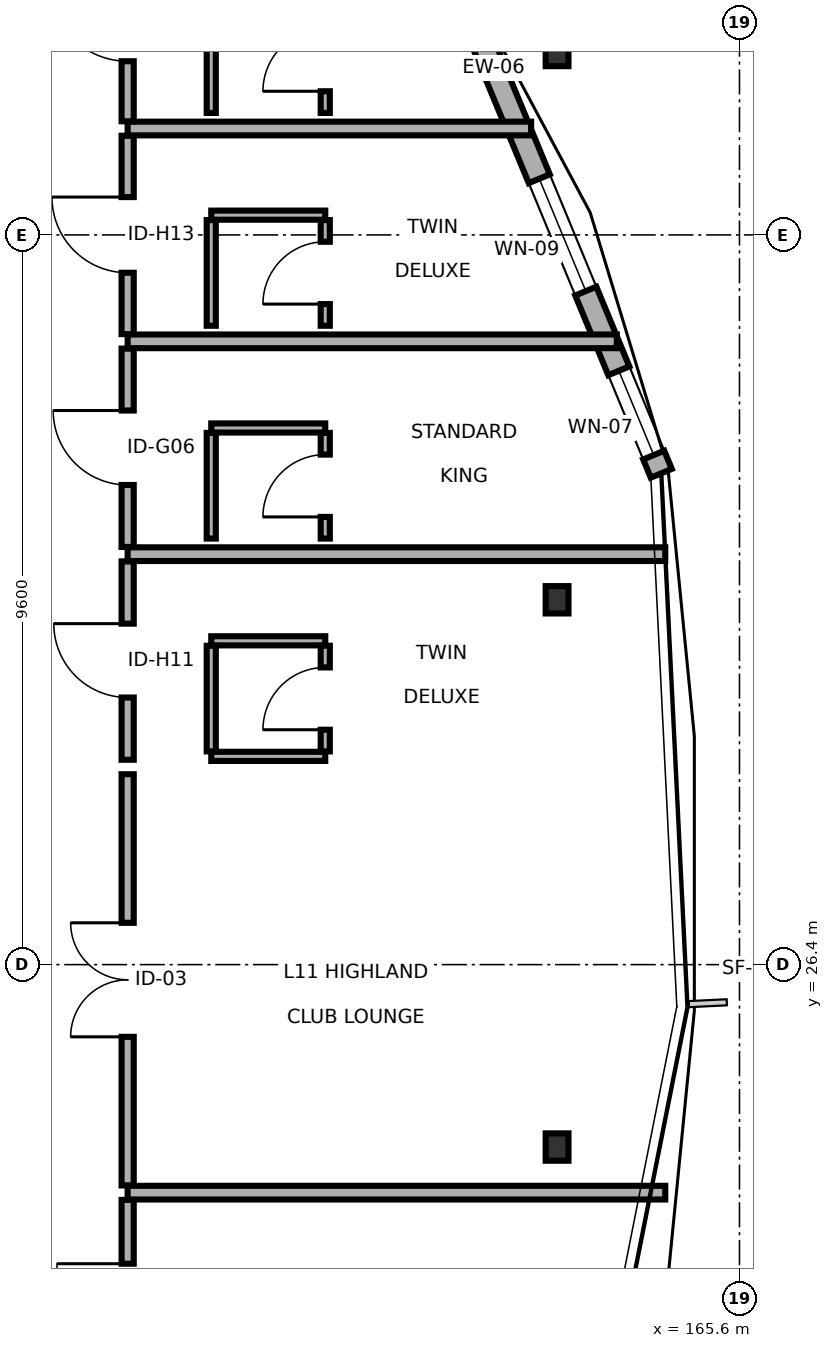
"""IFC4 building model, lengths in metres.
Left out: names, types, materials, properties, quantities, classifications, styles, units other than length and angle.
Written with IfcOpenShell. Run it as: python <this file> out.ifc"""

import sys

from ifc_helpers import new_model, si_unit, direction, frame, frame_2d, origin, origin_2d, place, context, subcontext, project, spatial, rectangle, i_section, extrude, element, fill, save


model = new_model("IFC4")
c1 = context("Model", 3, precision=1e-05, world=origin(), true_north=direction((0.0, 1.0)))
c2 = subcontext(c1, "Body", "Model", "MODEL_VIEW")
j1 = project(units=[si_unit("LENGTHUNIT", "METRE"), si_unit("PLANEANGLEUNIT", "RADIAN")], contexts=[c1])
p1 = place(None, origin())
s1 = spatial("IfcSite", under=j1, at=p1, CompositionType="ELEMENT")
p2 = place(p1, origin())
s2 = spatial("IfcBuilding", under=s1, at=p2, CompositionType="ELEMENT")
p3 = place(p2, frame((0.0, 0.0, 38.5)))
s3 = spatial("IfcBuildingStorey", under=s2, at=p3, CompositionType="ELEMENT", Elevation=38.5)
for number, where, z_axis, x_axis in (
    (1, (163.2, 24.0, 0.0), (0.0, 0.0, 1.0), (1.0, 0.0, 0.0)),
    (2, (163.2, 31.2, 0.0), (0.0, 0.0, 1.0), (1.0, 0.0, 0.0)),
    (3, (163.2, 38.4, 0.0), (0.0, 0.0, 1.0), (1.0, 0.0, 0.0)),
):
    element("IfcColumn", number, at=place(p3, frame(where, z_axis=z_axis, x_axis=x_axis)), inside=s3, PredefinedType="COLUMN", context=c2, shape_type="SweptSolid", body=[
        extrude(i_section(OverallWidth=0.3, OverallDepth=0.36, WebThickness=0.012, FlangeThickness=0.022, FilletRadius=0.027, at=origin_2d()), origin(), (0.0, 0.0, 1.0), 3.4),
    ])
p4 = place(p3, frame((164.571, 32.864, 0.0), z_axis=(0.0, 0.0, 1.0), x_axis=(-0.382706759774, 0.923869869637, 0.0)))
e4 = element("IfcWall", 4, at=p4, inside=s3, PredefinedType="SOLIDWALL", context=c2, shape_type="SweptSolid", body=[
    extrude(rectangle(XDim=7.006, YDim=0.3, at=frame_2d((3.503, 0.0))), origin(), (0.0, 0.0, 1.0), 2.695),
])
p5 = place(p4, frame((0.26, 0.0, 0.8)))
e5 = element("IfcOpeningElement", 5, at=p5, cuts=e4, PredefinedType="OPENING", context=c2, shape_type="SweptSolid", body=[
    extrude(rectangle(XDim=1.2, YDim=1.5, at=frame_2d((0.6, 0.75))), frame((0.0, 0.16, 0.0), z_axis=(0.0, -1.0, 0.0), x_axis=(1.0, 0.0, 0.0)), (0.0, 0.0, 1.0), 0.32),
])
p6 = place(p4, frame((2.594, 0.0, 0.8)))
e6 = element("IfcOpeningElement", 6, at=p6, cuts=e4, PredefinedType="OPENING", context=c2, shape_type="SweptSolid", body=[
    extrude(rectangle(XDim=1.6, YDim=1.5, at=frame_2d((0.8, 0.75))), frame((0.0, 0.16, 0.0), z_axis=(0.0, -1.0, 0.0), x_axis=(1.0, 0.0, 0.0)), (0.0, 0.0, 1.0), 0.32),
])
p7 = place(p3, frame((157.55, 23.495, 0.0), z_axis=(0.0, 0.0, 1.0), x_axis=(0.0, 1.0, 0.0)))
e7 = element("IfcWall", 7, at=p7, inside=s3, PredefinedType="PARTITIONING", context=c2, shape_type="SweptSolid", body=[
    extrude(rectangle(XDim=5.41, YDim=0.16, at=frame_2d((2.705, 0.0))), origin(), (0.0, 0.0, 1.0), 2.735),
])
p8 = place(p7, frame((1.955, 0.0, 0.0)))
e8 = element("IfcOpeningElement", 8, at=p8, cuts=e7, PredefinedType="OPENING", context=c2, shape_type="SweptSolid", body=[
    extrude(rectangle(XDim=1.5, YDim=2.25, at=frame_2d((0.75, 1.125))), frame((0.0, 0.09, 0.0), z_axis=(0.0, -1.0, 0.0), x_axis=(1.0, 0.0, 0.0)), (0.0, 0.0, 1.0), 0.18),
])
p9 = place(p3, frame((157.55, 20.695, 0.0), z_axis=(0.0, 0.0, 1.0), x_axis=(0.0, 1.0, 0.0)))
e9 = element("IfcWall", 9, at=p9, inside=s3, PredefinedType="PARTITIONING", context=c2, shape_type="SweptSolid", body=[
    extrude(rectangle(XDim=2.61, YDim=0.16, at=frame_2d((1.305, 0.0))), origin(), (0.0, 0.0, 1.0), 3.15),
])
p10 = place(p9, frame((0.84, 0.0, 0.0)))
e10 = element("IfcOpeningElement", 10, at=p10, cuts=e9, PredefinedType="OPENING", context=c2, shape_type="SweptSolid", body=[
    extrude(rectangle(XDim=0.93, YDim=2.05, at=frame_2d((0.465, 1.025))), frame((0.0, 0.09, 0.0), z_axis=(0.0, -1.0, 0.0), x_axis=(1.0, 0.0, 0.0)), (0.0, 0.0, 1.0), 0.18),
])
p11 = place(p3, frame((157.55, 23.4, 0.0), z_axis=(0.0, 0.0, 1.0), x_axis=(1.0, 0.0, 0.0)))
e11 = element("IfcWall", 11, at=p11, inside=s3, PredefinedType="PARTITIONING", context=c2, shape_type="SweptSolid", body=[
    extrude(rectangle(XDim=7.073, YDim=0.18, at=frame_2d((3.537, 0.0))), origin(), (0.0, 0.0, 1.0), 2.695),
])
p12 = place(p3, frame((157.55, 29.095, 0.0), z_axis=(0.0, 0.0, 1.0), x_axis=(0.0, 1.0, 0.0)))
e12 = element("IfcWall", 12, at=p12, inside=s3, PredefinedType="PARTITIONING", context=c2, shape_type="SweptSolid", body=[
    extrude(rectangle(XDim=2.61, YDim=0.16, at=frame_2d((1.305, 0.0))), origin(), (0.0, 0.0, 1.0), 2.735),
])
p13 = place(p12, frame((0.819, 0.0, 0.0)))
e13 = element("IfcOpeningElement", 13, at=p13, cuts=e12, PredefinedType="OPENING", context=c2, shape_type="SweptSolid", body=[
    extrude(rectangle(XDim=0.972, YDim=2.16, at=frame_2d((0.486, 1.08))), frame((0.0, 0.09, 0.0), z_axis=(0.0, -1.0, 0.0), x_axis=(1.0, 0.0, 0.0)), (0.0, 0.0, 1.0), 0.18),
])
for number, where, z_axis, x_axis in (
    (14, (158.65, 29.14, 0.0), (0.0, 0.0, 1.0), (1.0, 0.0, 0.0)),
    (15, (158.65, 30.66, 0.0), (0.0, 0.0, 1.0), (1.0, 0.0, 0.0)),
):
    element("IfcWall", number, at=place(p3, frame(where, z_axis=z_axis, x_axis=x_axis)), inside=s3, PredefinedType="PARTITIONING", context=c2, shape_type="SweptSolid", body=[
        extrude(rectangle(XDim=1.5, YDim=0.12, at=frame_2d((0.75, 0.0))), origin(), (0.0, 0.0, 1.0), 3.15),
    ])
p14 = place(p3, frame((158.65, 29.205, 0.0), z_axis=(0.0, 0.0, 1.0), x_axis=(0.0, 1.0, 0.0)))
e16 = element("IfcWall", 16, at=p14, inside=s3, PredefinedType="PARTITIONING", context=c2, shape_type="SweptSolid", body=[
    extrude(rectangle(XDim=1.39, YDim=0.12, at=frame_2d((0.695, 0.0))), origin(), (0.0, 0.0, 1.0), 3.15),
])
p15 = place(p3, frame((160.15, 29.205, 0.0), z_axis=(0.0, 0.0, 1.0), x_axis=(0.0, 1.0, 0.0)))
e17 = element("IfcWall", 17, at=p15, inside=s3, PredefinedType="PARTITIONING", context=c2, shape_type="SweptSolid", body=[
    extrude(rectangle(XDim=1.39, YDim=0.12, at=frame_2d((0.695, 0.0))), origin(), (0.0, 0.0, 1.0), 3.15),
])
p16 = place(p15, frame((0.285, 0.0, 0.0)))
e18 = element("IfcOpeningElement", 18, at=p16, cuts=e17, PredefinedType="OPENING", context=c2, shape_type="SweptSolid", body=[
    extrude(rectangle(XDim=0.82, YDim=2.08, at=frame_2d((0.41, 1.04))), frame((0.0, 0.07, 0.0), z_axis=(0.0, -1.0, 0.0), x_axis=(1.0, 0.0, 0.0)), (0.0, 0.0, 1.0), 0.14),
])
p17 = place(p3, frame((157.55, 31.8, 0.0), z_axis=(0.0, 0.0, 1.0), x_axis=(1.0, 0.0, 0.0)))
e19 = element("IfcWall", 19, at=p17, inside=s3, PredefinedType="PARTITIONING", context=c2, shape_type="SweptSolid", body=[
    extrude(rectangle(XDim=7.073, YDim=0.18, at=frame_2d((3.537, 0.0))), origin(), (0.0, 0.0, 1.0), 2.695),
])
p18 = place(p3, frame((157.55, 31.895, 0.0), z_axis=(0.0, 0.0, 1.0), x_axis=(0.0, 1.0, 0.0)))
e20 = element("IfcWall", 20, at=p18, inside=s3, PredefinedType="PARTITIONING", context=c2, shape_type="SweptSolid", body=[
    extrude(rectangle(XDim=2.61, YDim=0.16, at=frame_2d((1.305, 0.0))), origin(), (0.0, 0.0, 1.0), 3.15),
])
p19 = place(p18, frame((0.815, 0.0, 0.0)))
e21 = element("IfcOpeningElement", 21, at=p19, cuts=e20, PredefinedType="OPENING", context=c2, shape_type="SweptSolid", body=[
    extrude(rectangle(XDim=0.98, YDim=2.05, at=frame_2d((0.49, 1.025))), frame((0.0, 0.09, 0.0), z_axis=(0.0, -1.0, 0.0), x_axis=(1.0, 0.0, 0.0)), (0.0, 0.0, 1.0), 0.18),
])
p20 = place(p3, frame((158.65, 33.46, 0.0), z_axis=(0.0, 0.0, 1.0), x_axis=(1.0, 0.0, 0.0)))
e22 = element("IfcWall", 22, at=p20, inside=s3, PredefinedType="PARTITIONING", context=c2, shape_type="SweptSolid", body=[
    extrude(rectangle(XDim=1.5, YDim=0.12, at=frame_2d((0.75, 0.0))), origin(), (0.0, 0.0, 1.0), 3.15),
])
p21 = place(p3, frame((158.65, 32.005, 0.0), z_axis=(0.0, 0.0, 1.0), x_axis=(0.0, 1.0, 0.0)))
e23 = element("IfcWall", 23, at=p21, inside=s3, PredefinedType="PARTITIONING", context=c2, shape_type="SweptSolid", body=[
    extrude(rectangle(XDim=1.39, YDim=0.12, at=frame_2d((0.695, 0.0))), origin(), (0.0, 0.0, 1.0), 3.15),
])
p22 = place(p3, frame((160.15, 32.005, 0.0), z_axis=(0.0, 0.0, 1.0), x_axis=(0.0, 1.0, 0.0)))
e24 = element("IfcWall", 24, at=p22, inside=s3, PredefinedType="PARTITIONING", context=c2, shape_type="SweptSolid", body=[
    extrude(rectangle(XDim=1.39, YDim=0.12, at=frame_2d((0.695, 0.0))), origin(), (0.0, 0.0, 1.0), 3.15),
])
p23 = place(p22, frame((0.285, 0.0, 0.0)))
e25 = element("IfcOpeningElement", 25, at=p23, cuts=e24, PredefinedType="OPENING", context=c2, shape_type="SweptSolid", body=[
    extrude(rectangle(XDim=0.82, YDim=2.08, at=frame_2d((0.41, 1.04))), frame((0.0, 0.07, 0.0), z_axis=(0.0, -1.0, 0.0), x_axis=(1.0, 0.0, 0.0)), (0.0, 0.0, 1.0), 0.14),
])
p24 = place(p3, frame((157.55, 34.6, 0.0), z_axis=(0.0, 0.0, 1.0), x_axis=(1.0, 0.0, 0.0)))
e26 = element("IfcWall", 26, at=p24, inside=s3, PredefinedType="PARTITIONING", context=c2, shape_type="SweptSolid", body=[
    extrude(rectangle(XDim=6.436, YDim=0.18, at=frame_2d((3.218, 0.0))), origin(), (0.0, 0.0, 1.0), 2.695),
])
p25 = place(p3, frame((157.55, 34.695, 0.0), z_axis=(0.0, 0.0, 1.0), x_axis=(0.0, 1.0, 0.0)))
e27 = element("IfcWall", 27, at=p25, inside=s3, PredefinedType="PARTITIONING", context=c2, shape_type="SweptSolid", body=[
    extrude(rectangle(XDim=2.61, YDim=0.16, at=frame_2d((1.305, 0.0))), origin(), (0.0, 0.0, 1.0), 3.15),
])
p26 = place(p25, frame((0.807, 0.0, 0.0)))
e28 = element("IfcOpeningElement", 28, at=p26, cuts=e27, PredefinedType="OPENING", context=c2, shape_type="SweptSolid", body=[
    extrude(rectangle(XDim=0.996, YDim=2.1, at=frame_2d((0.498, 1.05))), frame((0.0, 0.09, 0.0), z_axis=(0.0, -1.0, 0.0), x_axis=(1.0, 0.0, 0.0)), (0.0, 0.0, 1.0), 0.18),
])
p27 = place(p3, frame((158.65, 36.26, 0.0), z_axis=(0.0, 0.0, 1.0), x_axis=(1.0, 0.0, 0.0)))
e29 = element("IfcWall", 29, at=p27, inside=s3, PredefinedType="PARTITIONING", context=c2, shape_type="SweptSolid", body=[
    extrude(rectangle(XDim=1.5, YDim=0.12, at=frame_2d((0.75, 0.0))), origin(), (0.0, 0.0, 1.0), 3.15),
])
p28 = place(p3, frame((158.65, 34.805, 0.0), z_axis=(0.0, 0.0, 1.0), x_axis=(0.0, 1.0, 0.0)))
e30 = element("IfcWall", 30, at=p28, inside=s3, PredefinedType="PARTITIONING", context=c2, shape_type="SweptSolid", body=[
    extrude(rectangle(XDim=1.39, YDim=0.12, at=frame_2d((0.695, 0.0))), origin(), (0.0, 0.0, 1.0), 3.15),
])
p29 = place(p3, frame((160.15, 34.805, 0.0), z_axis=(0.0, 0.0, 1.0), x_axis=(0.0, 1.0, 0.0)))
e31 = element("IfcWall", 31, at=p29, inside=s3, PredefinedType="PARTITIONING", context=c2, shape_type="SweptSolid", body=[
    extrude(rectangle(XDim=1.39, YDim=0.12, at=frame_2d((0.695, 0.0))), origin(), (0.0, 0.0, 1.0), 3.15),
])
p30 = place(p29, frame((0.285, 0.0, 0.0)))
e32 = element("IfcOpeningElement", 32, at=p30, cuts=e31, PredefinedType="OPENING", context=c2, shape_type="SweptSolid", body=[
    extrude(rectangle(XDim=0.82, YDim=2.08, at=frame_2d((0.41, 1.04))), frame((0.0, 0.07, 0.0), z_axis=(0.0, -1.0, 0.0), x_axis=(1.0, 0.0, 0.0)), (0.0, 0.0, 1.0), 0.14),
])
p31 = place(p3, frame((157.55, 37.4, 0.0), z_axis=(0.0, 0.0, 1.0), x_axis=(1.0, 0.0, 0.0)))
e33 = element("IfcWall", 33, at=p31, inside=s3, PredefinedType="PARTITIONING", context=c2, shape_type="SweptSolid", body=[
    extrude(rectangle(XDim=5.308, YDim=0.18, at=frame_2d((2.654, 0.0))), origin(), (0.0, 0.0, 1.0), 3.15),
])
p32 = place(p3, frame((157.55, 37.495, 0.0), z_axis=(0.0, 0.0, 1.0), x_axis=(0.0, 1.0, 0.0)))
e34 = element("IfcWall", 34, at=p32, inside=s3, PredefinedType="PARTITIONING", context=c2, shape_type="SweptSolid", body=[
    extrude(rectangle(XDim=2.61, YDim=0.16, at=frame_2d((1.305, 0.0))), origin(), (0.0, 0.0, 1.0), 2.735),
])
p33 = place(p32, frame((0.79, 0.0, 0.0)))
e35 = element("IfcOpeningElement", 35, at=p33, cuts=e34, PredefinedType="OPENING", context=c2, shape_type="SweptSolid", body=[
    extrude(rectangle(XDim=1.03, YDim=2.05, at=frame_2d((0.515, 1.025))), frame((0.0, 0.09, 0.0), z_axis=(0.0, -1.0, 0.0), x_axis=(1.0, 0.0, 0.0)), (0.0, 0.0, 1.0), 0.18),
])
p34 = place(p3, frame((158.65, 37.605, 0.0), z_axis=(0.0, 0.0, 1.0), x_axis=(0.0, 1.0, 0.0)))
e36 = element("IfcWall", 36, at=p34, inside=s3, PredefinedType="PARTITIONING", context=c2, shape_type="SweptSolid", body=[
    extrude(rectangle(XDim=1.39, YDim=0.12, at=frame_2d((0.695, 0.0))), origin(), (0.0, 0.0, 1.0), 2.735),
])
p35 = place(p3, frame((160.15, 37.605, 0.0), z_axis=(0.0, 0.0, 1.0), x_axis=(0.0, 1.0, 0.0)))
e37 = element("IfcWall", 37, at=p35, inside=s3, PredefinedType="PARTITIONING", context=c2, shape_type="SweptSolid", body=[
    extrude(rectangle(XDim=1.39, YDim=0.12, at=frame_2d((0.695, 0.0))), origin(), (0.0, 0.0, 1.0), 2.735),
])
p36 = place(p35, frame((0.285, 0.0, 0.0)))
e38 = element("IfcOpeningElement", 38, at=p36, cuts=e37, PredefinedType="OPENING", context=c2, shape_type="SweptSolid", body=[
    extrude(rectangle(XDim=0.82, YDim=2.08, at=frame_2d((0.41, 1.04))), frame((0.0, 0.07, 0.0), z_axis=(0.0, -1.0, 0.0), x_axis=(1.0, 0.0, 0.0)), (0.0, 0.0, 1.0), 0.14),
])
p37 = place(p5, origin())
e39 = element("IfcWindow", 39, at=p37, inside=s3, PartitioningType="SINGLE_PANEL", PredefinedType="WINDOW", context=c2, shape_type="SweptSolid", body=[
    extrude(rectangle(XDim=1.2, YDim=1.5, at=frame_2d((0.6, 0.75))), frame((0.0, 0.03, 0.0), z_axis=(0.0, -1.0, 0.0), x_axis=(1.0, 0.0, 0.0)), (0.0, 0.0, 1.0), 0.06),
])
fill(e5, e39)
p38 = place(p6, origin())
e40 = element("IfcWindow", 40, at=p38, inside=s3, PartitioningType="SINGLE_PANEL", PredefinedType="WINDOW", context=c2, shape_type="SweptSolid", body=[
    extrude(rectangle(XDim=1.6, YDim=1.5, at=frame_2d((0.8, 0.75))), frame((0.0, 0.03, 0.0), z_axis=(0.0, -1.0, 0.0), x_axis=(1.0, 0.0, 0.0)), (0.0, 0.0, 1.0), 0.06),
])
fill(e6, e40)
p39 = place(p8, origin())
e41 = element("IfcDoor", 41, at=p39, inside=s3, OperationType="DOUBLE_DOOR_SINGLE_SWING", PredefinedType="DOOR", context=c2, shape_type="SweptSolid", body=[
    extrude(rectangle(XDim=1.5, YDim=2.25, at=frame_2d((0.75, 1.125))), frame((0.0, 0.025, 0.0), z_axis=(0.0, -1.0, 0.0), x_axis=(1.0, 0.0, 0.0)), (0.0, 0.0, 1.0), 0.05),
])
fill(e8, e41)
p40 = place(p10, origin())
e42 = element("IfcDoor", 42, at=p40, inside=s3, OperationType="SINGLE_SWING_RIGHT", PredefinedType="DOOR", context=c2, shape_type="SweptSolid", body=[
    extrude(rectangle(XDim=0.93, YDim=2.05, at=frame_2d((0.465, 1.025))), frame((0.0, 0.025, 0.0), z_axis=(0.0, -1.0, 0.0), x_axis=(1.0, 0.0, 0.0)), (0.0, 0.0, 1.0), 0.05),
])
fill(e10, e42)
p41 = place(p13, origin())
e43 = element("IfcDoor", 43, at=p41, inside=s3, OperationType="SINGLE_SWING_RIGHT", PredefinedType="DOOR", context=c2, shape_type="SweptSolid", body=[
    extrude(rectangle(XDim=0.972, YDim=2.16, at=frame_2d((0.486, 1.08))), frame((0.0, 0.025, 0.0), z_axis=(0.0, -1.0, 0.0), x_axis=(1.0, 0.0, 0.0)), (0.0, 0.0, 1.0), 0.05),
])
fill(e13, e43)
p42 = place(p16, origin())
e44 = element("IfcDoor", 44, at=p42, inside=s3, OperationType="SINGLE_SWING_LEFT", PredefinedType="DOOR", context=c2, shape_type="SweptSolid", body=[
    extrude(rectangle(XDim=0.82, YDim=2.08, at=frame_2d((0.41, 1.04))), frame((0.0, 0.025, 0.0), z_axis=(0.0, -1.0, 0.0), x_axis=(1.0, 0.0, 0.0)), (0.0, 0.0, 1.0), 0.05),
])
fill(e18, e44)
p43 = place(p19, origin())
e45 = element("IfcDoor", 45, at=p43, inside=s3, OperationType="SINGLE_SWING_RIGHT", PredefinedType="DOOR", context=c2, shape_type="SweptSolid", body=[
    extrude(rectangle(XDim=0.98, YDim=2.05, at=frame_2d((0.49, 1.025))), frame((0.0, 0.025, 0.0), z_axis=(0.0, -1.0, 0.0), x_axis=(1.0, 0.0, 0.0)), (0.0, 0.0, 1.0), 0.05),
])
fill(e21, e45)
p44 = place(p23, origin())
e46 = element("IfcDoor", 46, at=p44, inside=s3, OperationType="SINGLE_SWING_LEFT", PredefinedType="DOOR", context=c2, shape_type="SweptSolid", body=[
    extrude(rectangle(XDim=0.82, YDim=2.08, at=frame_2d((0.41, 1.04))), frame((0.0, 0.025, 0.0), z_axis=(0.0, -1.0, 0.0), x_axis=(1.0, 0.0, 0.0)), (0.0, 0.0, 1.0), 0.05),
])
fill(e25, e46)
p45 = place(p26, origin())
e47 = element("IfcDoor", 47, at=p45, inside=s3, OperationType="SINGLE_SWING_RIGHT", PredefinedType="DOOR", context=c2, shape_type="SweptSolid", body=[
    extrude(rectangle(XDim=0.996, YDim=2.1, at=frame_2d((0.498, 1.05))), frame((0.0, 0.025, 0.0), z_axis=(0.0, -1.0, 0.0), x_axis=(1.0, 0.0, 0.0)), (0.0, 0.0, 1.0), 0.05),
])
fill(e28, e47)
p46 = place(p30, origin())
e48 = element("IfcDoor", 48, at=p46, inside=s3, OperationType="SINGLE_SWING_LEFT", PredefinedType="DOOR", context=c2, shape_type="SweptSolid", body=[
    extrude(rectangle(XDim=0.82, YDim=2.08, at=frame_2d((0.41, 1.04))), frame((0.0, 0.025, 0.0), z_axis=(0.0, -1.0, 0.0), x_axis=(1.0, 0.0, 0.0)), (0.0, 0.0, 1.0), 0.05),
])
fill(e32, e48)
p47 = place(p33, origin())
e49 = element("IfcDoor", 49, at=p47, inside=s3, OperationType="SINGLE_SWING_RIGHT", PredefinedType="DOOR", context=c2, shape_type="SweptSolid", body=[
    extrude(rectangle(XDim=1.03, YDim=2.05, at=frame_2d((0.515, 1.025))), frame((0.0, 0.025, 0.0), z_axis=(0.0, -1.0, 0.0), x_axis=(1.0, 0.0, 0.0)), (0.0, 0.0, 1.0), 0.05),
])
fill(e35, e49)
p48 = place(p36, origin())
e50 = element("IfcDoor", 50, at=p48, inside=s3, OperationType="SINGLE_SWING_LEFT", PredefinedType="DOOR", context=c2, shape_type="SweptSolid", body=[
    extrude(rectangle(XDim=0.82, YDim=2.08, at=frame_2d((0.41, 1.04))), frame((0.0, 0.025, 0.0), z_axis=(0.0, -1.0, 0.0), x_axis=(1.0, 0.0, 0.0)), (0.0, 0.0, 1.0), 0.05),
])
fill(e38, e50)
save(model, sys.argv[1])
